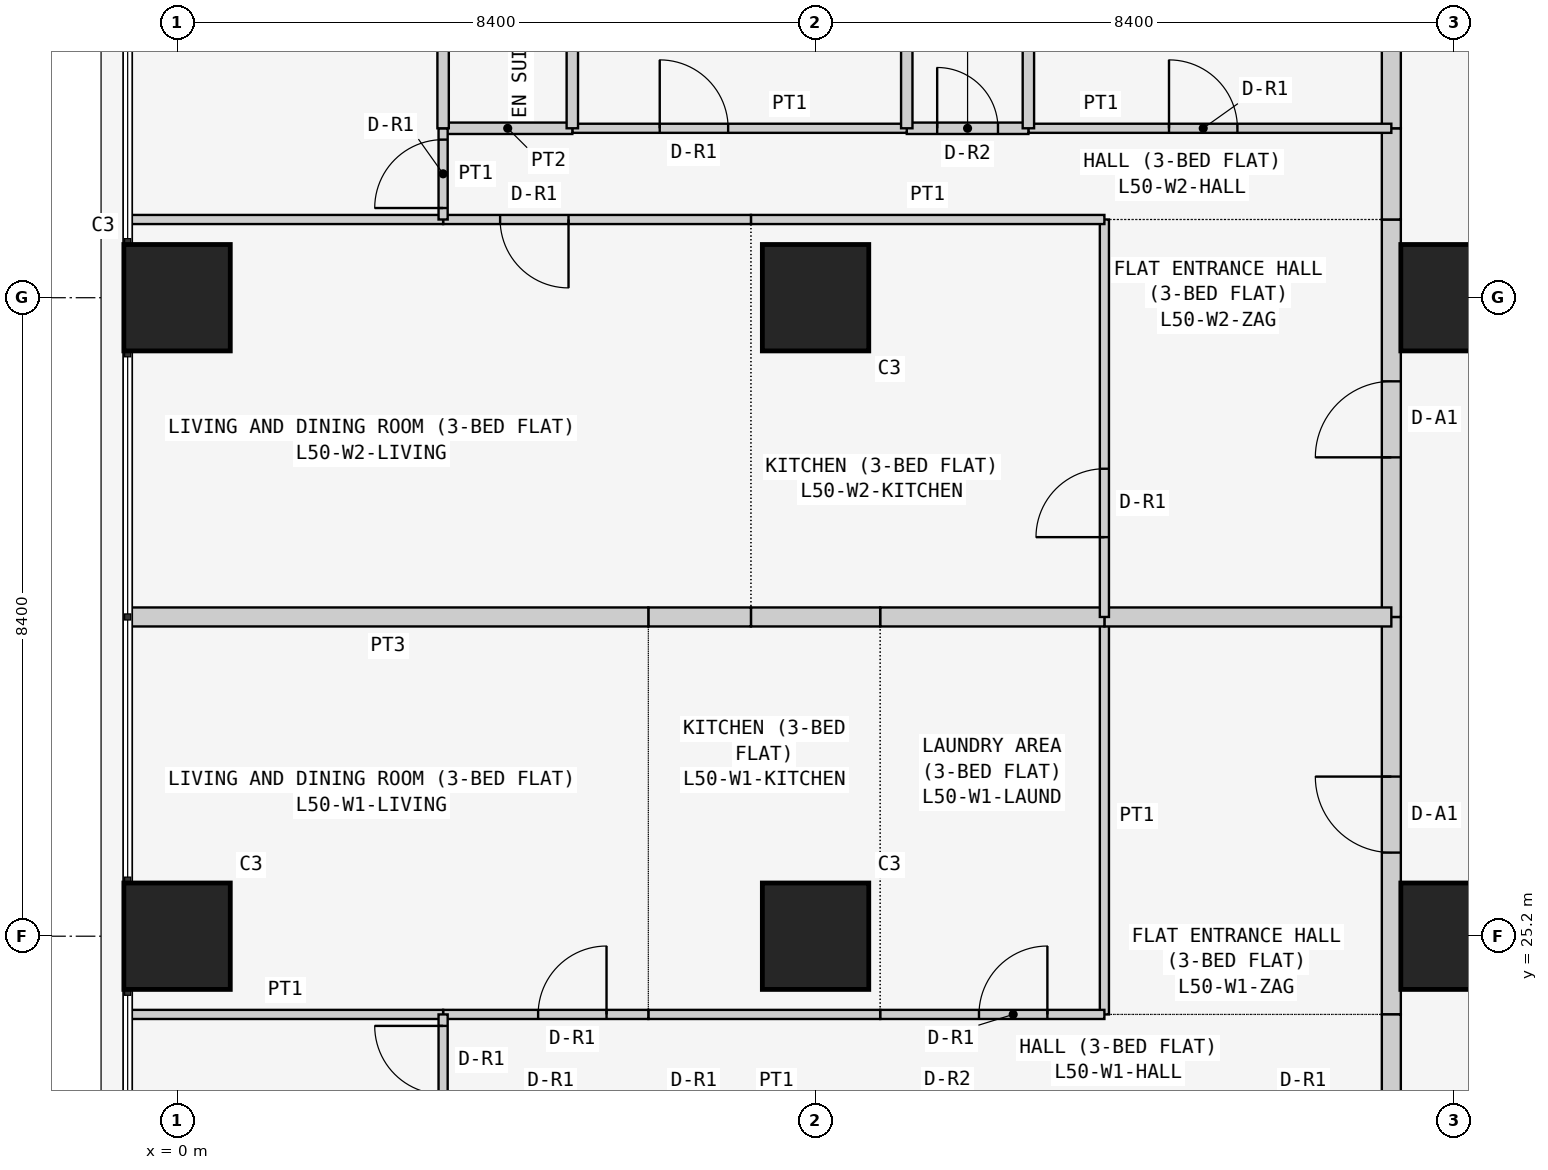
"""IFC4 building model, lengths in metres.
Left out: names, types, materials, properties, quantities, classifications, styles, units other than length and angle.
Written with IfcOpenShell. Run it as: python <this file> out.ifc"""

import sys

from ifc_helpers import new_model, si_unit, direction, frame, frame_2d, origin, origin_2d, place, context, subcontext, project, spatial, rectangle, extrude, element, fill, save


model = new_model("IFC4")
c1 = context("Model", 3, precision=1e-05, world=origin(), true_north=direction((0.0, 1.0)))
c2 = subcontext(c1, "Body", "Model", "MODEL_VIEW")
j1 = project(units=[si_unit("LENGTHUNIT", "METRE"), si_unit("PLANEANGLEUNIT", "RADIAN")], contexts=[c1])
p1 = place(None, origin())
s1 = spatial("IfcSite", under=j1, at=p1, CompositionType="ELEMENT")
p2 = place(p1, origin())
s2 = spatial("IfcBuilding", under=s1, at=p2, CompositionType="ELEMENT")
p3 = place(p2, frame((0.0, 0.0, 194.1)))
s3 = spatial("IfcBuildingStorey", under=s2, at=p3, CompositionType="ELEMENT", Elevation=194.1)
for number, where, z_axis, x_axis in (
    (1, (0.0, 25.2, 0.0), (0.0, 0.0, 1.0), (1.0, 0.0, 0.0)),
    (2, (0.0, 33.6, 0.0), (0.0, 0.0, 1.0), (1.0, 0.0, 0.0)),
    (3, (8.4, 25.2, 0.0), (0.0, 0.0, 1.0), (1.0, 0.0, 0.0)),
    (4, (8.4, 33.6, 0.0), (0.0, 0.0, 1.0), (1.0, 0.0, 0.0)),
    (5, (16.8, 25.2, 0.0), (0.0, 0.0, 1.0), (1.0, 0.0, 0.0)),
    (6, (16.8, 33.6, 0.0), (0.0, 0.0, 1.0), (1.0, 0.0, 0.0)),
):
    element("IfcColumn", number, at=place(p3, frame(where, z_axis=z_axis, x_axis=x_axis)), inside=s3, PredefinedType="COLUMN", context=c2, shape_type="SweptSolid", body=[
        extrude(rectangle(XDim=1.4, YDim=1.4, at=origin_2d()), origin(), (0.0, 0.0, 1.0), 3.6),
    ])
p4 = place(p3, frame((15.975, 24.171, 0.0), z_axis=(0.0, 0.0, 1.0), x_axis=(0.0, 1.0, 0.0)))
e7 = element("IfcWall", 7, at=p4, inside=s3, PredefinedType="PARTITIONING", context=c2, shape_type="SweptSolid", body=[
    extrude(rectangle(XDim=5.229, YDim=0.25, at=frame_2d((2.615, 0.0))), origin(), (0.0, 0.0, 1.0), 3.45),
])
p5 = place(p4, frame((2.129, 0.0, 0.0)))
e8 = element("IfcOpeningElement", 8, at=p5, cuts=e7, PredefinedType="OPENING", context=c2, shape_type="SweptSolid", body=[
    extrude(rectangle(XDim=1.0, YDim=2.1, at=frame_2d((0.5, 1.05))), frame((0.0, 0.135, 0.0), z_axis=(0.0, -1.0, 0.0), x_axis=(1.0, 0.0, 0.0)), (0.0, 0.0, 1.0), 0.27),
])
p6 = place(p3, frame((15.975, 22.971, 0.0), z_axis=(0.0, 0.0, 1.0), x_axis=(0.0, 1.0, 0.0)))
e9 = element("IfcWall", 9, at=p6, inside=s3, PredefinedType="PARTITIONING", context=c2, shape_type="SweptSolid", body=[
    extrude(rectangle(XDim=1.2, YDim=0.25, at=frame_2d((0.6, 0.0))), origin(), (0.0, 0.0, 1.0), 3.45),
])
p7 = place(p3, frame((15.975, 29.4, 0.0), z_axis=(0.0, 0.0, 1.0), x_axis=(0.0, 1.0, 0.0)))
e10 = element("IfcWall", 10, at=p7, inside=s3, PredefinedType="PARTITIONING", context=c2, shape_type="SweptSolid", body=[
    extrude(rectangle(XDim=5.229, YDim=0.25, at=frame_2d((2.615, 0.0))), origin(), (0.0, 0.0, 1.0), 3.45),
])
p8 = place(p7, frame((2.1, 0.0, 0.0)))
e11 = element("IfcOpeningElement", 11, at=p8, cuts=e10, PredefinedType="OPENING", context=c2, shape_type="SweptSolid", body=[
    extrude(rectangle(XDim=1.0, YDim=2.1, at=frame_2d((0.5, 1.05))), frame((0.0, 0.135, 0.0), z_axis=(0.0, -1.0, 0.0), x_axis=(1.0, 0.0, 0.0)), (0.0, 0.0, 1.0), 0.27),
])
p9 = place(p3, frame((15.975, 34.629, 0.0), z_axis=(0.0, 0.0, 1.0), x_axis=(0.0, 1.0, 0.0)))
e12 = element("IfcWall", 12, at=p9, inside=s3, PredefinedType="PARTITIONING", context=c2, shape_type="SweptSolid", body=[
    extrude(rectangle(XDim=1.2, YDim=0.25, at=frame_2d((0.6, 0.0))), origin(), (0.0, 0.0, 1.0), 3.45),
])
p10 = place(p3, frame((15.975, 35.829, 0.0), z_axis=(0.0, 0.0, 1.0), x_axis=(0.0, 1.0, 0.0)))
e13 = element("IfcWall", 13, at=p10, inside=s3, PredefinedType="PARTITIONING", context=c2, shape_type="SweptSolid", body=[
    extrude(rectangle(XDim=6.871, YDim=0.25, at=frame_2d((3.436, 0.0))), origin(), (0.0, 0.0, 1.0), 3.45),
])
p11 = place(p3, frame((12.2, 29.4, 0.0), z_axis=(0.0, 0.0, 1.0), x_axis=(0.0, -1.0, 0.0)))
e14 = element("IfcWall", 14, at=p11, inside=s3, PredefinedType="PARTITIONING", context=c2, shape_type="SweptSolid", body=[
    extrude(rectangle(XDim=5.229, YDim=0.12, at=frame_2d((2.615, 0.0))), origin(), (0.0, 0.0, 1.0), 3.45),
])
p12 = place(p3, frame((15.975, 29.4, 0.0), z_axis=(0.0, 0.0, 1.0), x_axis=(-1.0, 0.0, 0.0)))
e15 = element("IfcWall", 15, at=p12, inside=s3, PredefinedType="PARTITIONING", context=c2, shape_type="SweptSolid", body=[
    extrude(rectangle(XDim=3.775, YDim=0.25, at=frame_2d((1.888, 0.0))), origin(), (0.0, 0.0, 1.0), 3.45),
])
p13 = place(p3, frame((9.25, 24.171, 0.0), z_axis=(0.0, 0.0, 1.0), x_axis=(1.0, 0.0, 0.0)))
e16 = element("IfcWall", 16, at=p13, inside=s3, PredefinedType="PARTITIONING", context=c2, shape_type="SweptSolid", body=[
    extrude(rectangle(XDim=2.95, YDim=0.12, at=frame_2d((1.475, 0.0))), origin(), (0.0, 0.0, 1.0), 3.45),
])
p14 = place(p13, frame((1.3, 0.0, 0.0)))
e17 = element("IfcOpeningElement", 17, at=p14, cuts=e16, PredefinedType="OPENING", context=c2, shape_type="SweptSolid", body=[
    extrude(rectangle(XDim=0.9, YDim=2.1, at=frame_2d((0.45, 1.05))), frame((0.0, 0.07, 0.0), z_axis=(0.0, -1.0, 0.0), x_axis=(1.0, 0.0, 0.0)), (0.0, 0.0, 1.0), 0.14),
])
p15 = place(p3, frame((12.2, 29.4, 0.0), z_axis=(0.0, 0.0, 1.0), x_axis=(-1.0, 0.0, 0.0)))
e18 = element("IfcWall", 18, at=p15, inside=s3, PredefinedType="PARTITIONING", context=c2, shape_type="SweptSolid", body=[
    extrude(rectangle(XDim=2.95, YDim=0.25, at=frame_2d((1.475, 0.0))), origin(), (0.0, 0.0, 1.0), 3.45),
])
p16 = place(p3, frame((6.2, 24.171, 0.0), z_axis=(0.0, 0.0, 1.0), x_axis=(1.0, 0.0, 0.0)))
e19 = element("IfcWall", 19, at=p16, inside=s3, PredefinedType="PARTITIONING", context=c2, shape_type="SweptSolid", body=[
    extrude(rectangle(XDim=3.05, YDim=0.12, at=frame_2d((1.525, 0.0))), origin(), (0.0, 0.0, 1.0), 3.45),
])
p17 = place(p3, frame((9.25, 29.4, 0.0), z_axis=(0.0, 0.0, 1.0), x_axis=(-1.0, 0.0, 0.0)))
e20 = element("IfcWall", 20, at=p17, inside=s3, PredefinedType="PARTITIONING", context=c2, shape_type="SweptSolid", body=[
    extrude(rectangle(XDim=1.7, YDim=0.25, at=frame_2d((0.85, 0.0))), origin(), (0.0, 0.0, 1.0), 3.45),
])
p18 = place(p3, frame((7.55, 29.4, 0.0), z_axis=(0.0, 0.0, 1.0), x_axis=(-1.0, 0.0, 0.0)))
e21 = element("IfcWall", 21, at=p18, inside=s3, PredefinedType="PARTITIONING", context=c2, shape_type="SweptSolid", body=[
    extrude(rectangle(XDim=1.35, YDim=0.25, at=frame_2d((0.675, 0.0))), origin(), (0.0, 0.0, 1.0), 3.45),
])
p19 = place(p3, frame((3.5, 24.171, 0.0), z_axis=(0.0, 0.0, 1.0), x_axis=(1.0, 0.0, 0.0)))
e22 = element("IfcWall", 22, at=p19, inside=s3, PredefinedType="PARTITIONING", context=c2, shape_type="SweptSolid", body=[
    extrude(rectangle(XDim=2.7, YDim=0.12, at=frame_2d((1.35, 0.0))), origin(), (0.0, 0.0, 1.0), 3.45),
])
p20 = place(p19, frame((1.25, 0.0, 0.0)))
e23 = element("IfcOpeningElement", 23, at=p20, cuts=e22, PredefinedType="OPENING", context=c2, shape_type="SweptSolid", body=[
    extrude(rectangle(XDim=0.9, YDim=2.1, at=frame_2d((0.45, 1.05))), frame((0.0, 0.07, 0.0), z_axis=(0.0, -1.0, 0.0), x_axis=(1.0, 0.0, 0.0)), (0.0, 0.0, 1.0), 0.14),
])
p21 = place(p3, frame((-0.65, 24.171, 0.0), z_axis=(0.0, 0.0, 1.0), x_axis=(1.0, 0.0, 0.0)))
e24 = element("IfcWall", 24, at=p21, inside=s3, PredefinedType="PARTITIONING", context=c2, shape_type="SweptSolid", body=[
    extrude(rectangle(XDim=4.15, YDim=0.12, at=frame_2d((2.075, 0.0))), origin(), (0.0, 0.0, 1.0), 3.45),
])
p22 = place(p3, frame((6.2, 29.4, 0.0), z_axis=(0.0, 0.0, 1.0), x_axis=(-1.0, 0.0, 0.0)))
e25 = element("IfcWall", 25, at=p22, inside=s3, PredefinedType="PARTITIONING", context=c2, shape_type="SweptSolid", body=[
    extrude(rectangle(XDim=6.85, YDim=0.25, at=frame_2d((3.425, 0.0))), origin(), (0.0, 0.0, 1.0), 3.45),
])
p23 = place(p3, frame((3.5, 24.171, 0.0), z_axis=(0.0, 0.0, 1.0), x_axis=(0.0, -1.0, 0.0)))
e26 = element("IfcWall", 26, at=p23, inside=s3, PredefinedType="PARTITIONING", context=c2, shape_type="SweptSolid", body=[
    extrude(rectangle(XDim=1.2, YDim=0.12, at=frame_2d((0.6, 0.0))), origin(), (0.0, 0.0, 1.0), 3.45),
])
p24 = place(p23, frame((0.151, 0.0, 0.0)))
e27 = element("IfcOpeningElement", 27, at=p24, cuts=e26, PredefinedType="OPENING", context=c2, shape_type="SweptSolid", body=[
    extrude(rectangle(XDim=0.9, YDim=2.1, at=frame_2d((0.45, 1.05))), frame((0.0, 0.07, 0.0), z_axis=(0.0, -1.0, 0.0), x_axis=(1.0, 0.0, 0.0)), (0.0, 0.0, 1.0), 0.14),
])
p25 = place(p3, frame((12.2, 29.4, 0.0), z_axis=(0.0, 0.0, 1.0), x_axis=(0.0, 1.0, 0.0)))
e28 = element("IfcWall", 28, at=p25, inside=s3, PredefinedType="PARTITIONING", context=c2, shape_type="SweptSolid", body=[
    extrude(rectangle(XDim=5.229, YDim=0.12, at=frame_2d((2.615, 0.0))), origin(), (0.0, 0.0, 1.0), 3.45),
])
p26 = place(p25, frame((1.05, 0.0, 0.0)))
e29 = element("IfcOpeningElement", 29, at=p26, cuts=e28, PredefinedType="OPENING", context=c2, shape_type="SweptSolid", body=[
    extrude(rectangle(XDim=0.9, YDim=2.1, at=frame_2d((0.45, 1.05))), frame((0.0, 0.07, 0.0), z_axis=(0.0, -1.0, 0.0), x_axis=(1.0, 0.0, 0.0)), (0.0, 0.0, 1.0), 0.14),
])
p27 = place(p3, frame((7.55, 34.629, 0.0), z_axis=(0.0, 0.0, 1.0), x_axis=(1.0, 0.0, 0.0)))
e30 = element("IfcWall", 30, at=p27, inside=s3, PredefinedType="PARTITIONING", context=c2, shape_type="SweptSolid", body=[
    extrude(rectangle(XDim=4.65, YDim=0.12, at=frame_2d((2.325, 0.0))), origin(), (0.0, 0.0, 1.0), 3.45),
])
p28 = place(p3, frame((3.5, 34.629, 0.0), z_axis=(0.0, 0.0, 1.0), x_axis=(1.0, 0.0, 0.0)))
e31 = element("IfcWall", 31, at=p28, inside=s3, PredefinedType="PARTITIONING", context=c2, shape_type="SweptSolid", body=[
    extrude(rectangle(XDim=4.05, YDim=0.12, at=frame_2d((2.025, 0.0))), origin(), (0.0, 0.0, 1.0), 3.45),
])
p29 = place(p28, frame((0.75, 0.0, 0.0)))
e32 = element("IfcOpeningElement", 32, at=p29, cuts=e31, PredefinedType="OPENING", context=c2, shape_type="SweptSolid", body=[
    extrude(rectangle(XDim=0.9, YDim=2.1, at=frame_2d((0.45, 1.05))), frame((0.0, 0.07, 0.0), z_axis=(0.0, -1.0, 0.0), x_axis=(1.0, 0.0, 0.0)), (0.0, 0.0, 1.0), 0.14),
])
p30 = place(p3, frame((-0.65, 34.629, 0.0), z_axis=(0.0, 0.0, 1.0), x_axis=(1.0, 0.0, 0.0)))
e33 = element("IfcWall", 33, at=p30, inside=s3, PredefinedType="PARTITIONING", context=c2, shape_type="SweptSolid", body=[
    extrude(rectangle(XDim=4.15, YDim=0.12, at=frame_2d((2.075, 0.0))), origin(), (0.0, 0.0, 1.0), 3.45),
])
p31 = place(p3, frame((11.2, 35.829, 0.0), z_axis=(0.0, 0.0, 1.0), x_axis=(1.0, 0.0, 0.0)))
e34 = element("IfcWall", 34, at=p31, inside=s3, PredefinedType="PARTITIONING", context=c2, shape_type="SweptSolid", body=[
    extrude(rectangle(XDim=4.775, YDim=0.12, at=frame_2d((2.388, 0.0))), origin(), (0.0, 0.0, 1.0), 3.45),
])
p32 = place(p31, frame((1.85, 0.0, 0.0)))
e35 = element("IfcOpeningElement", 35, at=p32, cuts=e34, PredefinedType="OPENING", context=c2, shape_type="SweptSolid", body=[
    extrude(rectangle(XDim=0.9, YDim=2.1, at=frame_2d((0.45, 1.05))), frame((0.0, 0.07, 0.0), z_axis=(0.0, -1.0, 0.0), x_axis=(1.0, 0.0, 0.0)), (0.0, 0.0, 1.0), 0.14),
])
p33 = place(p3, frame((9.6, 35.829, 0.0), z_axis=(0.0, 0.0, 1.0), x_axis=(1.0, 0.0, 0.0)))
e36 = element("IfcWall", 36, at=p33, inside=s3, PredefinedType="PARTITIONING", context=c2, shape_type="SweptSolid", body=[
    extrude(rectangle(XDim=1.6, YDim=0.15, at=frame_2d((0.8, 0.0))), origin(), (0.0, 0.0, 1.0), 3.45),
])
p34 = place(p33, frame((0.4, 0.0, 0.0)))
e37 = element("IfcOpeningElement", 37, at=p34, cuts=e36, PredefinedType="OPENING", context=c2, shape_type="SweptSolid", body=[
    extrude(rectangle(XDim=0.8, YDim=2.1, at=frame_2d((0.4, 1.05))), frame((0.0, 0.085, 0.0), z_axis=(0.0, -1.0, 0.0), x_axis=(1.0, 0.0, 0.0)), (0.0, 0.0, 1.0), 0.17),
])
p35 = place(p3, frame((5.2, 35.829, 0.0), z_axis=(0.0, 0.0, 1.0), x_axis=(1.0, 0.0, 0.0)))
e38 = element("IfcWall", 38, at=p35, inside=s3, PredefinedType="PARTITIONING", context=c2, shape_type="SweptSolid", body=[
    extrude(rectangle(XDim=4.4, YDim=0.12, at=frame_2d((2.2, 0.0))), origin(), (0.0, 0.0, 1.0), 3.45),
])
p36 = place(p35, frame((1.15, 0.0, 0.0)))
e39 = element("IfcOpeningElement", 39, at=p36, cuts=e38, PredefinedType="OPENING", context=c2, shape_type="SweptSolid", body=[
    extrude(rectangle(XDim=0.9, YDim=2.1, at=frame_2d((0.45, 1.05))), frame((0.0, 0.07, 0.0), z_axis=(0.0, -1.0, 0.0), x_axis=(1.0, 0.0, 0.0)), (0.0, 0.0, 1.0), 0.14),
])
p37 = place(p3, frame((3.5, 35.829, 0.0), z_axis=(0.0, 0.0, 1.0), x_axis=(1.0, 0.0, 0.0)))
e40 = element("IfcWall", 40, at=p37, inside=s3, PredefinedType="PARTITIONING", context=c2, shape_type="SweptSolid", body=[
    extrude(rectangle(XDim=1.7, YDim=0.15, at=frame_2d((0.85, 0.0))), origin(), (0.0, 0.0, 1.0), 3.45),
])
p38 = place(p3, frame((3.5, 34.629, 0.0), z_axis=(0.0, 0.0, 1.0), x_axis=(0.0, 1.0, 0.0)))
e41 = element("IfcWall", 41, at=p38, inside=s3, PredefinedType="PARTITIONING", context=c2, shape_type="SweptSolid", body=[
    extrude(rectangle(XDim=1.2, YDim=0.12, at=frame_2d((0.6, 0.0))), origin(), (0.0, 0.0, 1.0), 3.45),
])
p39 = place(p38, frame((0.151, 0.0, 0.0)))
e42 = element("IfcOpeningElement", 42, at=p39, cuts=e41, PredefinedType="OPENING", context=c2, shape_type="SweptSolid", body=[
    extrude(rectangle(XDim=0.9, YDim=2.1, at=frame_2d((0.45, 1.05))), frame((0.0, 0.07, 0.0), z_axis=(0.0, -1.0, 0.0), x_axis=(1.0, 0.0, 0.0)), (0.0, 0.0, 1.0), 0.14),
])
for number, where, z_axis, x_axis in (
    (43, (11.2, 35.829, 0.0), (0.0, 0.0, 1.0), (0.0, 1.0, 0.0)),
    (44, (9.6, 35.829, 0.0), (0.0, 0.0, 1.0), (0.0, 1.0, 0.0)),
    (45, (5.2, 35.829, 0.0), (0.0, 0.0, 1.0), (0.0, 1.0, 0.0)),
):
    element("IfcWall", number, at=place(p3, frame(where, z_axis=z_axis, x_axis=x_axis)), inside=s3, PredefinedType="PARTITIONING", context=c2, shape_type="SweptSolid", body=[
        extrude(rectangle(XDim=6.871, YDim=0.15, at=frame_2d((3.436, 0.0))), origin(), (0.0, 0.0, 1.0), 3.45),
    ])
p40 = place(p3, frame((3.5, 35.829, 0.0), z_axis=(0.0, 0.0, 1.0), x_axis=(0.0, 1.0, 0.0)))
e46 = element("IfcWall", 46, at=p40, inside=s3, PredefinedType="PARTITIONING", context=c2, shape_type="SweptSolid", body=[
    extrude(rectangle(XDim=6.871, YDim=0.15, at=frame_2d((3.436, 0.0))), origin(), (0.0, 0.0, 1.0), 3.45),
])
p41 = place(p40, frame((3.171, 0.0, 0.0)))
e47 = element("IfcOpeningElement", 47, at=p41, cuts=e46, PredefinedType="OPENING", context=c2, shape_type="SweptSolid", body=[
    extrude(rectangle(XDim=0.8, YDim=2.1, at=frame_2d((0.4, 1.05))), frame((0.0, 0.085, 0.0), z_axis=(0.0, -1.0, 0.0), x_axis=(1.0, 0.0, 0.0)), (0.0, 0.0, 1.0), 0.17),
])
p42 = place(p5, origin())
e48 = element("IfcDoor", 48, at=p42, inside=s3, OperationType="SINGLE_SWING_RIGHT", PredefinedType="DOOR", context=c2, shape_type="SweptSolid", body=[
    extrude(rectangle(XDim=1.0, YDim=2.1, at=frame_2d((0.5, 1.05))), frame((0.0, 0.025, 0.0), z_axis=(0.0, -1.0, 0.0), x_axis=(1.0, 0.0, 0.0)), (0.0, 0.0, 1.0), 0.05),
])
fill(e8, e48)
p43 = place(p14, origin())
e49 = element("IfcDoor", 49, at=p43, inside=s3, OperationType="SINGLE_SWING_RIGHT", PredefinedType="DOOR", context=c2, shape_type="SweptSolid", body=[
    extrude(rectangle(XDim=0.9, YDim=2.1, at=frame_2d((0.45, 1.05))), frame((0.0, 0.025, 0.0), z_axis=(0.0, -1.0, 0.0), x_axis=(1.0, 0.0, 0.0)), (0.0, 0.0, 1.0), 0.05),
])
fill(e17, e49)
p44 = place(p20, origin())
e50 = element("IfcDoor", 50, at=p44, inside=s3, OperationType="SINGLE_SWING_RIGHT", PredefinedType="DOOR", context=c2, shape_type="SweptSolid", body=[
    extrude(rectangle(XDim=0.9, YDim=2.1, at=frame_2d((0.45, 1.05))), frame((0.0, 0.025, 0.0), z_axis=(0.0, -1.0, 0.0), x_axis=(1.0, 0.0, 0.0)), (0.0, 0.0, 1.0), 0.05),
])
fill(e23, e50)
p45 = place(p24, frame((0.9, 0.0, 0.0), z_axis=(0.0, 0.0, 1.0), x_axis=(-1.0, 0.0, 0.0)))
e51 = element("IfcDoor", 51, at=p45, inside=s3, OperationType="SINGLE_SWING_RIGHT", PredefinedType="DOOR", context=c2, shape_type="SweptSolid", body=[
    extrude(rectangle(XDim=0.9, YDim=2.1, at=frame_2d((0.45, 1.05))), frame((0.0, 0.025, 0.0), z_axis=(0.0, -1.0, 0.0), x_axis=(1.0, 0.0, 0.0)), (0.0, 0.0, 1.0), 0.05),
])
fill(e27, e51)
p46 = place(p8, origin())
e52 = element("IfcDoor", 52, at=p46, inside=s3, OperationType="SINGLE_SWING_LEFT", PredefinedType="DOOR", context=c2, shape_type="SweptSolid", body=[
    extrude(rectangle(XDim=1.0, YDim=2.1, at=frame_2d((0.5, 1.05))), frame((0.0, 0.025, 0.0), z_axis=(0.0, -1.0, 0.0), x_axis=(1.0, 0.0, 0.0)), (0.0, 0.0, 1.0), 0.05),
])
fill(e11, e52)
p47 = place(p26, origin())
e53 = element("IfcDoor", 53, at=p47, inside=s3, OperationType="SINGLE_SWING_LEFT", PredefinedType="DOOR", context=c2, shape_type="SweptSolid", body=[
    extrude(rectangle(XDim=0.9, YDim=2.1, at=frame_2d((0.45, 1.05))), frame((0.0, 0.025, 0.0), z_axis=(0.0, -1.0, 0.0), x_axis=(1.0, 0.0, 0.0)), (0.0, 0.0, 1.0), 0.05),
])
fill(e29, e53)
p48 = place(p29, frame((0.9, 0.0, 0.0), z_axis=(0.0, 0.0, 1.0), x_axis=(-1.0, 0.0, 0.0)))
e54 = element("IfcDoor", 54, at=p48, inside=s3, OperationType="SINGLE_SWING_LEFT", PredefinedType="DOOR", context=c2, shape_type="SweptSolid", body=[
    extrude(rectangle(XDim=0.9, YDim=2.1, at=frame_2d((0.45, 1.05))), frame((0.0, 0.025, 0.0), z_axis=(0.0, -1.0, 0.0), x_axis=(1.0, 0.0, 0.0)), (0.0, 0.0, 1.0), 0.05),
])
fill(e32, e54)
p49 = place(p32, origin())
e55 = element("IfcDoor", 55, at=p49, inside=s3, OperationType="SINGLE_SWING_LEFT", PredefinedType="DOOR", context=c2, shape_type="SweptSolid", body=[
    extrude(rectangle(XDim=0.9, YDim=2.1, at=frame_2d((0.45, 1.05))), frame((0.0, 0.025, 0.0), z_axis=(0.0, -1.0, 0.0), x_axis=(1.0, 0.0, 0.0)), (0.0, 0.0, 1.0), 0.05),
])
fill(e35, e55)
p50 = place(p34, origin())
e56 = element("IfcDoor", 56, at=p50, inside=s3, OperationType="SINGLE_SWING_LEFT", PredefinedType="DOOR", context=c2, shape_type="SweptSolid", body=[
    extrude(rectangle(XDim=0.8, YDim=2.1, at=frame_2d((0.4, 1.05))), frame((0.0, 0.025, 0.0), z_axis=(0.0, -1.0, 0.0), x_axis=(1.0, 0.0, 0.0)), (0.0, 0.0, 1.0), 0.05),
])
fill(e37, e56)
p51 = place(p36, origin())
e57 = element("IfcDoor", 57, at=p51, inside=s3, OperationType="SINGLE_SWING_LEFT", PredefinedType="DOOR", context=c2, shape_type="SweptSolid", body=[
    extrude(rectangle(XDim=0.9, YDim=2.1, at=frame_2d((0.45, 1.05))), frame((0.0, 0.025, 0.0), z_axis=(0.0, -1.0, 0.0), x_axis=(1.0, 0.0, 0.0)), (0.0, 0.0, 1.0), 0.05),
])
fill(e39, e57)
p52 = place(p39, origin())
e58 = element("IfcDoor", 58, at=p52, inside=s3, OperationType="SINGLE_SWING_LEFT", PredefinedType="DOOR", context=c2, shape_type="SweptSolid", body=[
    extrude(rectangle(XDim=0.9, YDim=2.1, at=frame_2d((0.45, 1.05))), frame((0.0, 0.025, 0.0), z_axis=(0.0, -1.0, 0.0), x_axis=(1.0, 0.0, 0.0)), (0.0, 0.0, 1.0), 0.05),
])
fill(e42, e58)
save(model, sys.argv[1])
